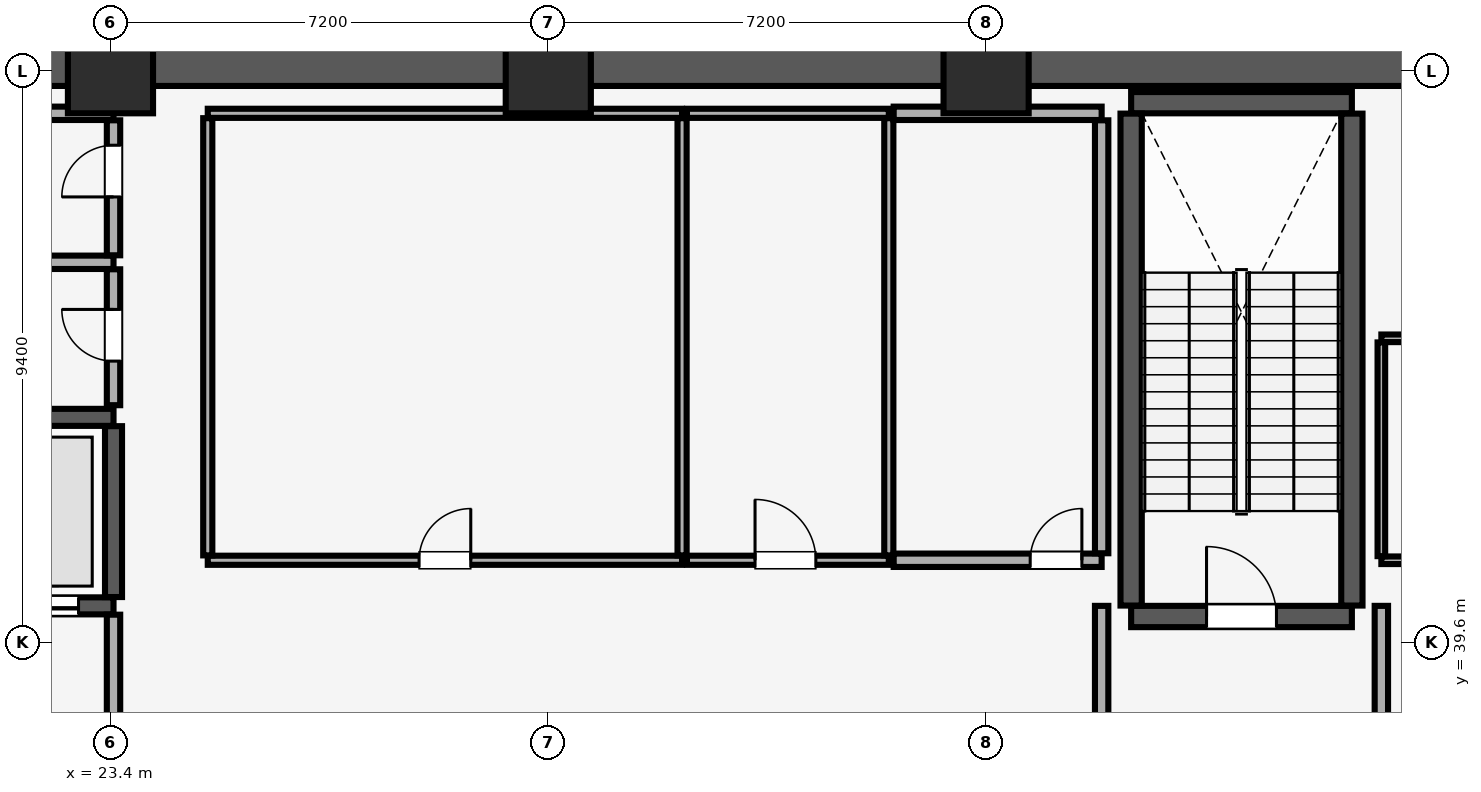
"""IFC4 building model, lengths in metres.
Left out: names, types, materials, properties, quantities, classifications, styles, units other than length and angle.
Written with IfcOpenShell. Run it as: python <this file> out.ifc"""

import sys

from ifc_helpers import new_model, si_unit, direction, frame, frame_2d, origin, origin_2d, place, context, subcontext, project, spatial, rectangle, extrude, element, fill, save


model = new_model("IFC4")
c1 = context("Model", 3, precision=1e-05, world=origin(), true_north=direction((0.0, 1.0)))
c2 = subcontext(c1, "Body", "Model", "MODEL_VIEW")
j1 = project(units=[si_unit("LENGTHUNIT", "METRE"), si_unit("PLANEANGLEUNIT", "RADIAN")], contexts=[c1])
p1 = place(None, origin())
s1 = spatial("IfcSite", under=j1, at=p1, CompositionType="ELEMENT")
p2 = place(p1, origin())
s2 = spatial("IfcBuilding", under=s1, at=p2, CompositionType="ELEMENT")
p3 = place(p2, frame((0.0, 0.0, 14.0)))
s3 = spatial("IfcBuildingStorey", under=s2, at=p3, CompositionType="ELEMENT", Elevation=14.0)
for number, where, z_axis, x_axis in (
    (1, (23.4, 49.0, 0.0), (0.0, 0.0, 1.0), (1.0, 0.0, 0.0)),
    (2, (30.6, 49.0, 0.0), (0.0, 0.0, 1.0), (1.0, 0.0, 0.0)),
    (3, (37.8, 49.0, 0.0), (0.0, 0.0, 1.0), (1.0, 0.0, 0.0)),
):
    element("IfcColumn", number, at=place(p3, frame(where, z_axis=z_axis, x_axis=x_axis)), inside=s3, PredefinedType="COLUMN", context=c2, shape_type="SweptSolid", body=[
        extrude(rectangle(XDim=1.4, YDim=1.4, at=origin_2d()), origin(), (0.0, 0.0, 1.0), 5.08),
    ])
p4 = place(p3, frame((16.2, 49.3, 0.0), z_axis=(0.0, 0.0, 1.0), x_axis=(1.0, 0.0, 0.0)))
e4 = element("IfcWall", 4, at=p4, inside=s3, PredefinedType="SHEAR", context=c2, shape_type="SweptSolid", body=[
    extrude(rectangle(XDim=51.6, YDim=1.1, at=frame_2d((25.8, 0.0))), origin(), (0.0, 0.0, 1.0), 5.08),
])
p5 = place(p3, frame((40.185, 40.025, 0.0), z_axis=(0.0, 0.0, 1.0), x_axis=(1.0, 0.0, 0.0)))
e5 = element("IfcWall", 5, at=p5, inside=s3, PredefinedType="SHEAR", context=c2, shape_type="SweptSolid", body=[
    extrude(rectangle(XDim=3.63, YDim=0.35, at=frame_2d((1.815, 0.0))), origin(), (0.0, 0.0, 1.0), 5.08),
])
p6 = place(p5, frame((1.24, 0.0, 0.0)))
e6 = element("IfcOpeningElement", 6, at=p6, cuts=e5, PredefinedType="OPENING", context=c2, shape_type="SweptSolid", body=[
    extrude(rectangle(XDim=1.15, YDim=2.15, at=frame_2d((0.575, 1.075))), frame((0.0, 0.185, 0.0), z_axis=(0.0, -1.0, 0.0), x_axis=(1.0, 0.0, 0.0)), (0.0, 0.0, 1.0), 0.37),
])
p7 = place(p3, frame((40.185, 48.475, 0.0), z_axis=(0.0, 0.0, 1.0), x_axis=(1.0, 0.0, 0.0)))
e7 = element("IfcWall", 7, at=p7, inside=s3, PredefinedType="SHEAR", context=c2, shape_type="SweptSolid", body=[
    extrude(rectangle(XDim=3.63, YDim=0.35, at=frame_2d((1.815, 0.0))), origin(), (0.0, 0.0, 1.0), 5.08),
])
for number, where, z_axis, x_axis in (
    (8, (40.185, 40.205, 0.0), (0.0, 0.0, 1.0), (0.0, 1.0, 0.0)),
    (9, (43.815, 40.205, 0.0), (0.0, 0.0, 1.0), (0.0, 1.0, 0.0)),
):
    element("IfcWall", number, at=place(p3, frame(where, z_axis=z_axis, x_axis=x_axis)), inside=s3, PredefinedType="SHEAR", context=c2, shape_type="SweptSolid", body=[
        extrude(rectangle(XDim=8.09, YDim=0.35, at=frame_2d((4.045, 0.0))), origin(), (0.0, 0.0, 1.0), 5.08),
    ])
p8 = place(p3, frame((21.035, 40.2, 0.0), z_axis=(0.0, 0.0, 1.0), x_axis=(1.0, 0.0, 0.0)))
e10 = element("IfcWall", 10, at=p8, inside=s3, PredefinedType="SHEAR", context=c2, shape_type="SweptSolid", body=[
    extrude(rectangle(XDim=2.415, YDim=0.28, at=frame_2d((1.208, 0.0))), origin(), (0.0, 0.0, 1.0), 5.08),
])
p9 = place(p8, frame((0.54, 0.0, 0.0)))
e11 = element("IfcOpeningElement", 11, at=p9, cuts=e10, PredefinedType="OPENING", context=c2, shape_type="SweptSolid", body=[
    extrude(rectangle(XDim=1.3, YDim=2.3, at=frame_2d((0.65, 1.15))), frame((0.0, 0.15, 0.0), z_axis=(0.0, -1.0, 0.0), x_axis=(1.0, 0.0, 0.0)), (0.0, 0.0, 1.0), 0.3),
])
p10 = place(p3, frame((21.035, 43.3, 0.0), z_axis=(0.0, 0.0, 1.0), x_axis=(1.0, 0.0, 0.0)))
e12 = element("IfcWall", 12, at=p10, inside=s3, PredefinedType="SHEAR", context=c2, shape_type="SweptSolid", body=[
    extrude(rectangle(XDim=2.415, YDim=0.28, at=frame_2d((1.208, 0.0))), origin(), (0.0, 0.0, 1.0), 5.08),
])
p11 = place(p3, frame((23.45, 40.345, 0.0), z_axis=(0.0, 0.0, 1.0), x_axis=(0.0, 1.0, 0.0)))
e13 = element("IfcWall", 13, at=p11, inside=s3, PredefinedType="SHEAR", context=c2, shape_type="SweptSolid", body=[
    extrude(rectangle(XDim=2.81, YDim=0.28, at=frame_2d((1.405, 0.0))), origin(), (0.0, 0.0, 1.0), 5.08),
])
p12 = place(p3, frame((23.45, 34.415, 0.0), z_axis=(0.0, 0.0, 1.0), x_axis=(0.0, 1.0, 0.0)))
e14 = element("IfcWall", 14, at=p12, inside=s3, PredefinedType="PARTITIONING", context=c2, shape_type="SweptSolid", body=[
    extrude(rectangle(XDim=5.64, YDim=0.22, at=frame_2d((2.82, 0.0))), origin(), (0.0, 0.0, 1.0), 5.08),
])
for number, where, z_axis, x_axis in (
    (15, (39.7, 34.415, 0.0), (0.0, 0.0, 1.0), (0.0, 1.0, 0.0)),
    (16, (44.3, 34.415, 0.0), (0.0, 0.0, 1.0), (0.0, 1.0, 0.0)),
):
    element("IfcWall", number, at=place(p3, frame(where, z_axis=z_axis, x_axis=x_axis)), inside=s3, PredefinedType="PARTITIONING", context=c2, shape_type="SweptSolid", body=[
        extrude(rectangle(XDim=5.785, YDim=0.22, at=frame_2d((2.893, 0.0))), origin(), (0.0, 0.0, 1.0), 5.08),
    ])
p13 = place(p3, frame((21.035, 45.85, 0.0), z_axis=(0.0, 0.0, 1.0), x_axis=(1.0, 0.0, 0.0)))
e17 = element("IfcWall", 17, at=p13, inside=s3, PredefinedType="PARTITIONING", context=c2, shape_type="SweptSolid", body=[
    extrude(rectangle(XDim=2.415, YDim=0.22, at=frame_2d((1.208, 0.0))), origin(), (0.0, 0.0, 1.0), 5.08),
])
p14 = place(p3, frame((23.45, 43.5, 0.0), z_axis=(0.0, 0.0, 1.0), x_axis=(0.0, 1.0, 0.0)))
e18 = element("IfcWall", 18, at=p14, inside=s3, PredefinedType="PARTITIONING", context=c2, shape_type="SweptSolid", body=[
    extrude(rectangle(XDim=2.235, YDim=0.22, at=frame_2d((1.118, 0.0))), origin(), (0.0, 0.0, 1.0), 5.08),
])
p15 = place(p14, frame((0.725, 0.0, 0.0)))
e19 = element("IfcOpeningElement", 19, at=p15, cuts=e18, PredefinedType="OPENING", context=c2, shape_type="SweptSolid", body=[
    extrude(rectangle(XDim=0.85, YDim=2.1, at=frame_2d((0.425, 1.05))), frame((0.0, 0.12, 0.0), z_axis=(0.0, -1.0, 0.0), x_axis=(1.0, 0.0, 0.0)), (0.0, 0.0, 1.0), 0.24),
])
p16 = place(p3, frame((21.035, 48.3, 0.0), z_axis=(0.0, 0.0, 1.0), x_axis=(1.0, 0.0, 0.0)))
e20 = element("IfcWall", 20, at=p16, inside=s3, PredefinedType="PARTITIONING", context=c2, shape_type="SweptSolid", body=[
    extrude(rectangle(XDim=2.415, YDim=0.22, at=frame_2d((1.208, 0.0))), origin(), (0.0, 0.0, 1.0), 5.08),
])
p17 = place(p3, frame((23.45, 45.965, 0.0), z_axis=(0.0, 0.0, 1.0), x_axis=(0.0, 1.0, 0.0)))
e21 = element("IfcWall", 21, at=p17, inside=s3, PredefinedType="PARTITIONING", context=c2, shape_type="SweptSolid", body=[
    extrude(rectangle(XDim=2.22, YDim=0.22, at=frame_2d((1.11, 0.0))), origin(), (0.0, 0.0, 1.0), 5.08),
])
p18 = place(p17, frame((0.96, 0.0, 0.0)))
e22 = element("IfcOpeningElement", 22, at=p18, cuts=e21, PredefinedType="OPENING", context=c2, shape_type="SweptSolid", body=[
    extrude(rectangle(XDim=0.85, YDim=2.1, at=frame_2d((0.425, 1.05))), frame((0.0, 0.12, 0.0), z_axis=(0.0, -1.0, 0.0), x_axis=(1.0, 0.0, 0.0)), (0.0, 0.0, 1.0), 0.24),
])
p19 = place(p3, frame((25.0, 40.95, 0.0), z_axis=(0.0, 0.0, 1.0), x_axis=(1.0, 0.0, 0.0)))
e23 = element("IfcWall", 23, at=p19, inside=s3, PredefinedType="PARTITIONING", context=c2, shape_type="SweptSolid", body=[
    extrude(rectangle(XDim=7.8, YDim=0.15, at=frame_2d((3.9, 0.0))), origin(), (0.0, 0.0, 1.0), 5.08),
])
p20 = place(p19, frame((3.475, 0.0, 0.0)))
e24 = element("IfcOpeningElement", 24, at=p20, cuts=e23, PredefinedType="OPENING", context=c2, shape_type="SweptSolid", body=[
    extrude(rectangle(XDim=0.85, YDim=2.1, at=frame_2d((0.425, 1.05))), frame((0.0, 0.085, 0.0), z_axis=(0.0, -1.0, 0.0), x_axis=(1.0, 0.0, 0.0)), (0.0, 0.0, 1.0), 0.17),
])
p21 = place(p3, frame((25.0, 48.3, 0.0), z_axis=(0.0, 0.0, 1.0), x_axis=(1.0, 0.0, 0.0)))
e25 = element("IfcWall", 25, at=p21, inside=s3, PredefinedType="PARTITIONING", context=c2, shape_type="SweptSolid", body=[
    extrude(rectangle(XDim=7.8, YDim=0.15, at=frame_2d((3.9, 0.0))), origin(), (0.0, 0.0, 1.0), 5.08),
])
for number, where, z_axis, x_axis in (
    (26, (25.0, 41.03, 0.0), (0.0, 0.0, 1.0), (0.0, 1.0, 0.0)),
    (27, (32.8, 41.03, 0.0), (0.0, 0.0, 1.0), (0.0, 1.0, 0.0)),
):
    element("IfcWall", number, at=place(p3, frame(where, z_axis=z_axis, x_axis=x_axis)), inside=s3, PredefinedType="PARTITIONING", context=c2, shape_type="SweptSolid", body=[
        extrude(rectangle(XDim=7.19, YDim=0.15, at=frame_2d((3.595, 0.0))), origin(), (0.0, 0.0, 1.0), 5.08),
    ])
p22 = place(p3, frame((32.88, 40.95, 0.0), z_axis=(0.0, 0.0, 1.0), x_axis=(1.0, 0.0, 0.0)))
e28 = element("IfcWall", 28, at=p22, inside=s3, PredefinedType="PARTITIONING", context=c2, shape_type="SweptSolid", body=[
    extrude(rectangle(XDim=3.32, YDim=0.15, at=frame_2d((1.66, 0.0))), origin(), (0.0, 0.0, 1.0), 5.08),
])
p23 = place(p22, frame((1.12, 0.0, 0.0)))
e29 = element("IfcOpeningElement", 29, at=p23, cuts=e28, PredefinedType="OPENING", context=c2, shape_type="SweptSolid", body=[
    extrude(rectangle(XDim=1.0, YDim=2.15, at=frame_2d((0.5, 1.075))), frame((0.0, 0.085, 0.0), z_axis=(0.0, -1.0, 0.0), x_axis=(1.0, 0.0, 0.0)), (0.0, 0.0, 1.0), 0.17),
])
p24 = place(p3, frame((32.88, 48.3, 0.0), z_axis=(0.0, 0.0, 1.0), x_axis=(1.0, 0.0, 0.0)))
e30 = element("IfcWall", 30, at=p24, inside=s3, PredefinedType="PARTITIONING", context=c2, shape_type="SweptSolid", body=[
    extrude(rectangle(XDim=3.32, YDim=0.15, at=frame_2d((1.66, 0.0))), origin(), (0.0, 0.0, 1.0), 5.08),
])
p25 = place(p3, frame((36.2, 41.03, 0.0), z_axis=(0.0, 0.0, 1.0), x_axis=(0.0, 1.0, 0.0)))
e31 = element("IfcWall", 31, at=p25, inside=s3, PredefinedType="PARTITIONING", context=c2, shape_type="SweptSolid", body=[
    extrude(rectangle(XDim=7.19, YDim=0.15, at=frame_2d((3.595, 0.0))), origin(), (0.0, 0.0, 1.0), 5.08),
])
p26 = place(p3, frame((36.28, 40.95, 0.0), z_axis=(0.0, 0.0, 1.0), x_axis=(1.0, 0.0, 0.0)))
e32 = element("IfcWall", 32, at=p26, inside=s3, PredefinedType="PARTITIONING", context=c2, shape_type="SweptSolid", body=[
    extrude(rectangle(XDim=3.42, YDim=0.22, at=frame_2d((1.71, 0.0))), origin(), (0.0, 0.0, 1.0), 5.08),
])
p27 = place(p26, frame((2.245, 0.0, 0.0)))
e33 = element("IfcOpeningElement", 33, at=p27, cuts=e32, PredefinedType="OPENING", context=c2, shape_type="SweptSolid", body=[
    extrude(rectangle(XDim=0.85, YDim=2.1, at=frame_2d((0.425, 1.05))), frame((0.0, 0.12, 0.0), z_axis=(0.0, -1.0, 0.0), x_axis=(1.0, 0.0, 0.0)), (0.0, 0.0, 1.0), 0.24),
])
p28 = place(p3, frame((36.28, 48.3, 0.0), z_axis=(0.0, 0.0, 1.0), x_axis=(1.0, 0.0, 0.0)))
e34 = element("IfcWall", 34, at=p28, inside=s3, PredefinedType="PARTITIONING", context=c2, shape_type="SweptSolid", body=[
    extrude(rectangle(XDim=3.42, YDim=0.22, at=frame_2d((1.71, 0.0))), origin(), (0.0, 0.0, 1.0), 5.08),
])
p29 = place(p3, frame((39.7, 41.065, 0.0), z_axis=(0.0, 0.0, 1.0), x_axis=(0.0, 1.0, 0.0)))
e35 = element("IfcWall", 35, at=p29, inside=s3, PredefinedType="PARTITIONING", context=c2, shape_type="SweptSolid", body=[
    extrude(rectangle(XDim=7.12, YDim=0.22, at=frame_2d((3.56, 0.0))), origin(), (0.0, 0.0, 1.0), 5.08),
])
p30 = place(p3, frame((44.3, 40.95, 0.0), z_axis=(0.0, 0.0, 1.0), x_axis=(1.0, 0.0, 0.0)))
e36 = element("IfcWall", 36, at=p30, inside=s3, PredefinedType="PARTITIONING", context=c2, shape_type="SweptSolid", body=[
    extrude(rectangle(XDim=4.6, YDim=0.125, at=frame_2d((2.3, 0.0))), origin(), (0.0, 0.0, 1.0), 5.08),
])
p31 = place(p30, frame((2.85, 0.0, 0.0)))
e37 = element("IfcOpeningElement", 37, at=p31, cuts=e36, PredefinedType="OPENING", context=c2, shape_type="SweptSolid", body=[
    extrude(rectangle(XDim=0.9, YDim=2.1, at=frame_2d((0.45, 1.05))), frame((0.0, 0.073, 0.0), z_axis=(0.0, -1.0, 0.0), x_axis=(1.0, 0.0, 0.0)), (0.0, 0.0, 1.0), 0.145),
])
p32 = place(p3, frame((44.3, 44.6, 0.0), z_axis=(0.0, 0.0, 1.0), x_axis=(1.0, 0.0, 0.0)))
e38 = element("IfcWall", 38, at=p32, inside=s3, PredefinedType="PARTITIONING", context=c2, shape_type="SweptSolid", body=[
    extrude(rectangle(XDim=4.6, YDim=0.125, at=frame_2d((2.3, 0.0))), origin(), (0.0, 0.0, 1.0), 5.08),
])
p33 = place(p3, frame((44.3, 41.018, 0.0), z_axis=(0.0, 0.0, 1.0), x_axis=(0.0, 1.0, 0.0)))
e39 = element("IfcWall", 39, at=p33, inside=s3, PredefinedType="PARTITIONING", context=c2, shape_type="SweptSolid", body=[
    extrude(rectangle(XDim=3.515, YDim=0.125, at=frame_2d((1.757, 0.0))), origin(), (0.0, 0.0, 1.0), 5.08),
])
p34 = place(p6, origin())
e40 = element("IfcDoor", 40, at=p34, inside=s3, OperationType="SINGLE_SWING_LEFT", PredefinedType="DOOR", context=c2, shape_type="SweptSolid", body=[
    extrude(rectangle(XDim=1.15, YDim=2.15, at=frame_2d((0.575, 1.075))), frame((0.0, 0.025, 0.0), z_axis=(0.0, -1.0, 0.0), x_axis=(1.0, 0.0, 0.0)), (0.0, 0.0, 1.0), 0.05),
])
fill(e6, e40)
p35 = place(p9, origin())
e41 = element("IfcDoor", 41, at=p35, inside=s3, OperationType="DOUBLE_DOOR_SLIDING", PredefinedType="DOOR", context=c2, shape_type="SweptSolid", body=[
    extrude(rectangle(XDim=1.3, YDim=2.3, at=frame_2d((0.65, 1.15))), frame((0.0, 0.025, 0.0), z_axis=(0.0, -1.0, 0.0), x_axis=(1.0, 0.0, 0.0)), (0.0, 0.0, 1.0), 0.05),
])
fill(e11, e41)
p36 = place(p15, origin())
e42 = element("IfcDoor", 42, at=p36, inside=s3, OperationType="SINGLE_SWING_RIGHT", PredefinedType="DOOR", context=c2, shape_type="SweptSolid", body=[
    extrude(rectangle(XDim=0.85, YDim=2.1, at=frame_2d((0.425, 1.05))), frame((0.0, 0.025, 0.0), z_axis=(0.0, -1.0, 0.0), x_axis=(1.0, 0.0, 0.0)), (0.0, 0.0, 1.0), 0.05),
])
fill(e19, e42)
p37 = place(p18, origin())
e43 = element("IfcDoor", 43, at=p37, inside=s3, OperationType="SINGLE_SWING_LEFT", PredefinedType="DOOR", context=c2, shape_type="SweptSolid", body=[
    extrude(rectangle(XDim=0.85, YDim=2.1, at=frame_2d((0.425, 1.05))), frame((0.0, 0.025, 0.0), z_axis=(0.0, -1.0, 0.0), x_axis=(1.0, 0.0, 0.0)), (0.0, 0.0, 1.0), 0.05),
])
fill(e22, e43)
p38 = place(p20, origin())
e44 = element("IfcDoor", 44, at=p38, inside=s3, OperationType="SINGLE_SWING_RIGHT", PredefinedType="DOOR", context=c2, shape_type="SweptSolid", body=[
    extrude(rectangle(XDim=0.85, YDim=2.1, at=frame_2d((0.425, 1.05))), frame((0.0, 0.025, 0.0), z_axis=(0.0, -1.0, 0.0), x_axis=(1.0, 0.0, 0.0)), (0.0, 0.0, 1.0), 0.05),
])
fill(e24, e44)
p39 = place(p23, origin())
e45 = element("IfcDoor", 45, at=p39, inside=s3, OperationType="SINGLE_SWING_LEFT", PredefinedType="DOOR", context=c2, shape_type="SweptSolid", body=[
    extrude(rectangle(XDim=1.0, YDim=2.15, at=frame_2d((0.5, 1.075))), frame((0.0, 0.025, 0.0), z_axis=(0.0, -1.0, 0.0), x_axis=(1.0, 0.0, 0.0)), (0.0, 0.0, 1.0), 0.05),
])
fill(e29, e45)
p40 = place(p27, origin())
e46 = element("IfcDoor", 46, at=p40, inside=s3, OperationType="SINGLE_SWING_RIGHT", PredefinedType="DOOR", context=c2, shape_type="SweptSolid", body=[
    extrude(rectangle(XDim=0.85, YDim=2.1, at=frame_2d((0.425, 1.05))), frame((0.0, 0.025, 0.0), z_axis=(0.0, -1.0, 0.0), x_axis=(1.0, 0.0, 0.0)), (0.0, 0.0, 1.0), 0.05),
])
fill(e33, e46)
save(model, sys.argv[1])
